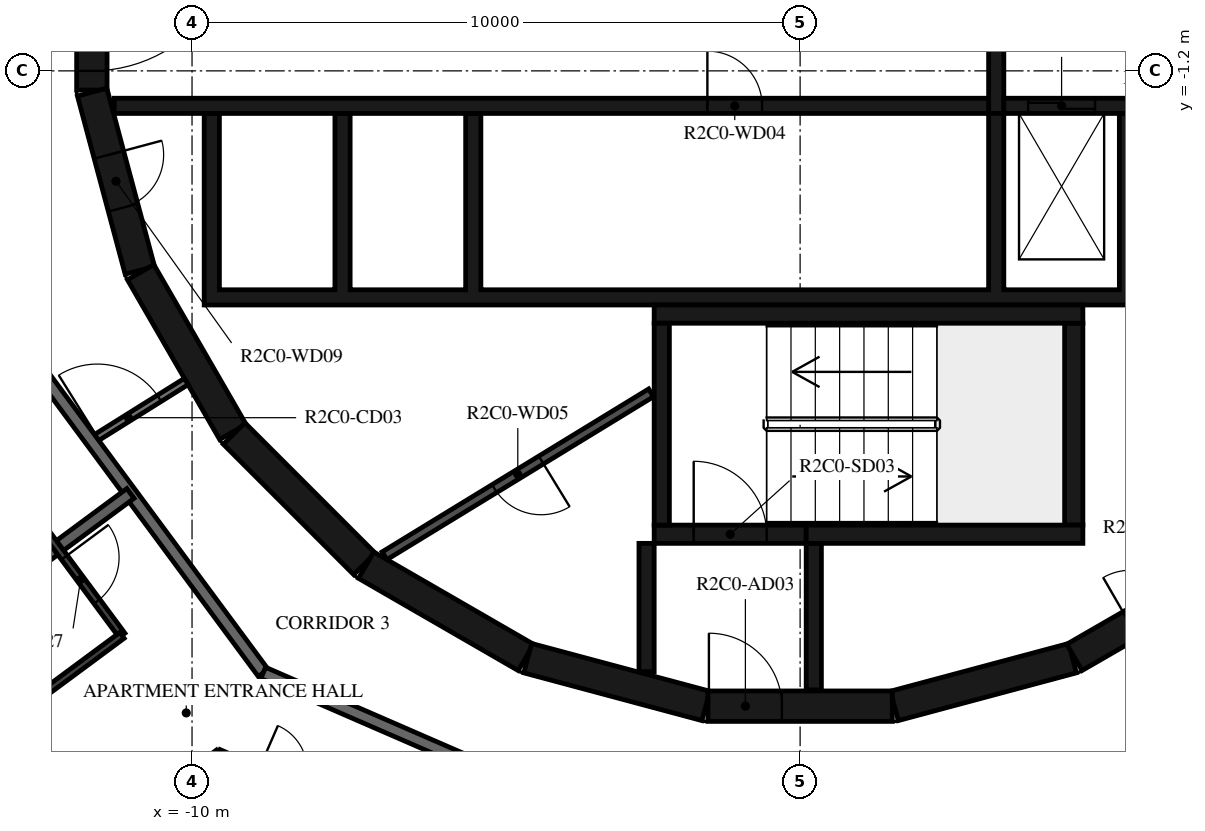
"""IFC4 building model, lengths in metres.
Left out: names, types, materials, properties, quantities, classifications, styles, units other than length and angle.
Written with IfcOpenShell. Run it as: python <this file> out.ifc"""

import sys

from ifc_helpers import new_model, si_unit, direction, frame, frame_2d, origin, place, context, subcontext, project, spatial, polyline, rectangle, outline, extrude, element, fill, save


model = new_model("IFC4")
c1 = context("Model", 3, precision=1e-05, world=origin(), true_north=direction((0.0, 1.0)))
c2 = subcontext(c1, "Body", "Model", "MODEL_VIEW")
j1 = project(units=[si_unit("LENGTHUNIT", "METRE"), si_unit("PLANEANGLEUNIT", "RADIAN")], contexts=[c1])
p1 = place(None, origin())
s1 = spatial("IfcSite", under=j1, at=p1, CompositionType="ELEMENT")
p2 = place(p1, origin())
s2 = spatial("IfcBuilding", under=s1, at=p2, CompositionType="ELEMENT")
p3 = place(p2, frame((0.0, 0.0, 104.7)))
s3 = spatial("IfcBuildingStorey", under=s2, at=p3, CompositionType="ELEMENT", Elevation=104.7)
p4 = place(p3, frame((1.55, -11.643, 0.0), z_axis=(0.0, 0.0, 1.0), x_axis=(0.965948410781, 0.258734743916, 0.0)))
e1 = element("IfcWall", 1, at=p4, inside=s3, PredefinedType="SHEAR", context=c2, shape_type="SweptSolid", body=[
    extrude(rectangle(XDim=3.033, YDim=0.5, at=frame_2d((1.516, 0.0))), origin(), (0.0, 0.0, 1.0), 3.05),
])
p5 = place(p3, frame((4.51, -10.845, 0.0), z_axis=(0.0, 0.0, 1.0), x_axis=(0.865975092491, 0.500087131594, 0.0)))
e2 = element("IfcWall", 2, at=p5, inside=s3, PredefinedType="SHEAR", context=c2, shape_type="SweptSolid", body=[
    extrude(rectangle(XDim=3.033, YDim=0.5, at=frame_2d((1.516, 0.0))), origin(), (0.0, 0.0, 1.0), 3.05),
])
p6 = place(p5, frame((1.066, 0.0, 0.0)))
e3 = element("IfcOpeningElement", 3, at=p6, cuts=e2, PredefinedType="OPENING", context=c2, shape_type="SweptSolid", body=[
    extrude(rectangle(XDim=0.9, YDim=2.1, at=frame_2d((0.45, 1.05))), frame((0.0, 0.26, 0.0), z_axis=(0.0, -1.0, 0.0), x_axis=(1.0, 0.0, 0.0)), (0.0, 0.0, 1.0), 0.52),
])
p7 = place(p3, frame((-11.647, 1.516, 0.0), z_axis=(0.0, 0.0, 1.0), x_axis=(0.0, -1.0, 0.0)))
e4 = element("IfcWall", 4, at=p7, inside=s3, PredefinedType="SHEAR", context=c2, shape_type="SweptSolid", body=[
    extrude(rectangle(XDim=3.033, YDim=0.5, at=frame_2d((1.516, 0.0))), origin(), (0.0, 0.0, 1.0), 3.05),
])
p8 = place(p7, frame((0.316, 0.0, 0.0)))
e5 = element("IfcOpeningElement", 5, at=p8, cuts=e4, PredefinedType="OPENING", context=c2, shape_type="SweptSolid", body=[
    extrude(rectangle(XDim=2.4, YDim=2.1, at=frame_2d((1.2, 1.05))), frame((0.0, 0.26, 0.0), z_axis=(0.0, -1.0, 0.0), x_axis=(1.0, 0.0, 0.0)), (0.0, 0.0, 1.0), 0.52),
])
p9 = place(p3, frame((-11.643, -1.55, 0.0), z_axis=(0.0, 0.0, 1.0), x_axis=(0.258734743916, -0.965948410781, 0.0)))
e6 = element("IfcWall", 6, at=p9, inside=s3, PredefinedType="SHEAR", context=c2, shape_type="SweptSolid", body=[
    extrude(rectangle(XDim=3.033, YDim=0.5, at=frame_2d((1.516, 0.0))), origin(), (0.0, 0.0, 1.0), 3.05),
])
p10 = place(p9, frame((1.066, 0.0, 0.0)))
e7 = element("IfcOpeningElement", 7, at=p10, cuts=e6, PredefinedType="OPENING", context=c2, shape_type="SweptSolid", body=[
    extrude(rectangle(XDim=0.9, YDim=2.1, at=frame_2d((0.45, 1.05))), frame((0.0, 0.26, 0.0), z_axis=(0.0, -1.0, 0.0), x_axis=(1.0, 0.0, 0.0)), (0.0, 0.0, 1.0), 0.52),
])
p11 = place(p3, frame((-10.845, -4.51, 0.0), z_axis=(0.0, 0.0, 1.0), x_axis=(0.500087131594, -0.865975092491, 0.0)))
e8 = element("IfcWall", 8, at=p11, inside=s3, PredefinedType="SHEAR", context=c2, shape_type="SweptSolid", body=[
    extrude(rectangle(XDim=3.033, YDim=0.5, at=frame_2d((1.516, 0.0))), origin(), (0.0, 0.0, 1.0), 3.05),
])
p12 = place(p3, frame((-9.308, -7.164, 0.0), z_axis=(0.0, 0.0, 1.0), x_axis=(0.707106781187, -0.707106781187, 0.0)))
e9 = element("IfcWall", 9, at=p12, inside=s3, PredefinedType="SHEAR", context=c2, shape_type="SweptSolid", body=[
    extrude(rectangle(XDim=3.032, YDim=0.5, at=frame_2d((1.516, 0.0))), origin(), (0.0, 0.0, 1.0), 3.05),
])
for number, where, z_axis, x_axis in (
    (10, (-7.137, -9.329, 0.0), (0.0, 0.0, 1.0), (0.866, -0.5, 0.0)),
    (11, (-4.479, -10.858, 0.0), (0.0, 0.0, 1.0), (0.966, -0.259, 0.0)),
):
    element("IfcWall", number, at=place(p3, frame(where, z_axis=z_axis, x_axis=x_axis)), inside=s3, PredefinedType="SHEAR", context=c2, shape_type="SweptSolid", body=[
        extrude(rectangle(XDim=3.033, YDim=0.5, at=frame_2d((1.516, 0.0))), origin(), (0.0, 0.0, 1.0), 3.05),
    ])
p13 = place(p3, frame((-1.516, -11.647, 0.0), z_axis=(0.0, 0.0, 1.0), x_axis=(1.0, 0.0, 0.0)))
e12 = element("IfcWall", 12, at=p13, inside=s3, PredefinedType="SHEAR", context=c2, shape_type="SweptSolid", body=[
    extrude(rectangle(XDim=3.033, YDim=0.5, at=frame_2d((1.516, 0.0))), origin(), (0.0, 0.0, 1.0), 3.05),
])
p14 = place(p13, frame((0.016, 0.0, 0.0)))
e13 = element("IfcOpeningElement", 13, at=p14, cuts=e12, PredefinedType="OPENING", context=c2, shape_type="SweptSolid", body=[
    extrude(rectangle(XDim=1.2, YDim=2.1, at=frame_2d((0.6, 1.05))), frame((0.0, 0.26, 0.0), z_axis=(0.0, -1.0, 0.0), x_axis=(1.0, 0.0, 0.0)), (0.0, 0.0, 1.0), 0.52),
])
p15 = place(p3, frame((-2.275, -8.67, 0.0), z_axis=(0.0, 0.0, 1.0), x_axis=(0.0, 1.0, 0.0)))
e14 = element("IfcWall", 14, at=p15, inside=s3, PredefinedType="SHEAR", context=c2, shape_type="SweptSolid", body=[
    extrude(rectangle(XDim=3.32, YDim=0.25, at=frame_2d((1.66, 0.0))), origin(), (0.0, 0.0, 1.0), 3.05),
])
p16 = place(p3, frame((-2.4, -5.2, 0.0), z_axis=(0.0, 0.0, 1.0), x_axis=(1.0, 0.0, 0.0)))
e15 = element("IfcWall", 15, at=p16, inside=s3, PredefinedType="SHEAR", context=c2, shape_type="SweptSolid", body=[
    extrude(rectangle(XDim=7.05, YDim=0.3, at=frame_2d((3.525, 0.0))), origin(), (0.0, 0.0, 1.0), 3.05),
])
p17 = place(p3, frame((4.5, -8.67, 0.0), z_axis=(0.0, 0.0, 1.0), x_axis=(0.0, 1.0, 0.0)))
e16 = element("IfcWall", 16, at=p17, inside=s3, PredefinedType="SHEAR", context=c2, shape_type="SweptSolid", body=[
    extrude(rectangle(XDim=3.32, YDim=0.3, at=frame_2d((1.66, 0.0))), origin(), (0.0, 0.0, 1.0), 3.05),
])
p18 = place(p3, frame((0.1, -8.82, 0.0), z_axis=(0.0, 0.0, 1.0), x_axis=(1.0, 0.0, 0.0)))
e17 = element("IfcWall", 17, at=p18, inside=s3, PredefinedType="SHEAR", context=c2, shape_type="SweptSolid", body=[
    extrude(rectangle(XDim=4.55, YDim=0.3, at=frame_2d((2.275, 0.0))), origin(), (0.0, 0.0, 1.0), 3.05),
])
p19 = place(p3, frame((-2.4, -8.82, 0.0), z_axis=(0.0, 0.0, 1.0), x_axis=(1.0, 0.0, 0.0)))
e18 = element("IfcWall", 18, at=p19, inside=s3, PredefinedType="SHEAR", context=c2, shape_type="SweptSolid", body=[
    extrude(rectangle(XDim=2.5, YDim=0.3, at=frame_2d((1.25, 0.0))), origin(), (0.0, 0.0, 1.0), 3.05),
])
p20 = place(p19, frame((0.65, 0.0, 0.0)))
e19 = element("IfcOpeningElement", 19, at=p20, cuts=e18, PredefinedType="OPENING", context=c2, shape_type="SweptSolid", body=[
    extrude(rectangle(XDim=1.2, YDim=2.1, at=frame_2d((0.6, 1.05))), frame((0.0, 0.16, 0.0), z_axis=(0.0, -1.0, 0.0), x_axis=(1.0, 0.0, 0.0)), (0.0, 0.0, 1.0), 0.32),
])
p21 = place(p3, frame((-2.525, -8.97, 0.0), z_axis=(0.0, 0.0, 1.0), x_axis=(0.0, -1.0, 0.0)))
e20 = element("IfcWall", 20, at=p21, inside=s3, PredefinedType="SHEAR", context=c2, shape_type="SweptSolid", body=[
    extrude(rectangle(XDim=2.11, YDim=0.25, at=frame_2d((1.055, 0.0))), origin(), (0.0, 0.0, 1.0), 3.05),
])
p22 = place(p3, frame((0.225, -8.97, 0.0), z_axis=(0.0, 0.0, 1.0), x_axis=(0.0, -1.0, 0.0)))
e21 = element("IfcWall", 21, at=p22, inside=s3, PredefinedType="SHEAR", context=c2, shape_type="SweptSolid", body=[
    extrude(rectangle(XDim=2.41, YDim=0.25, at=frame_2d((1.205, 0.0))), origin(), (0.0, 0.0, 1.0), 3.05),
])
p23 = place(p3, origin())
e22 = element("IfcWall", 22, at=p23, inside=s3, PredefinedType="SHEAR", context=c2, shape_type="SweptSolid", body=[
    extrude(outline(polyline([(9.8, -5.05), (9.8, -4.8), (9.8, -1.9), (9.55, -1.9), (9.55, -4.8), (7.65, -4.8), (7.65, -1.9), (7.4, -1.9), (7.4, -4.8), (5.5, -4.8), (5.5, -1.9), (5.25, -1.9), (5.25, -4.8), (3.35, -4.8), (3.35, -1.9), (3.1, -1.9), (3.1, -4.8), (-5.25, -4.8), (-5.25, -1.9), (-5.5, -1.9), (-5.5, -4.8), (-7.4, -4.8), (-7.4, -1.9), (-7.65, -1.9), (-7.65, -4.8), (-9.55, -4.8), (-9.55, -1.9), (-9.8, -1.9), (-9.8, -4.8), (-9.8, -5.05), (9.8, -5.05)])), origin(), (0.0, 0.0, 1.0), 3.05),
])
p24 = place(p3, frame((-11.28, -1.775, 0.0), z_axis=(0.0, 0.0, 1.0), x_axis=(1.0, 0.0, 0.0)))
e23 = element("IfcWall", 23, at=p24, inside=s3, PredefinedType="SHEAR", context=c2, shape_type="SweptSolid", body=[
    extrude(rectangle(XDim=14.38, YDim=0.25, at=frame_2d((7.19, 0.0))), origin(), (0.0, 0.0, 1.0), 3.05),
])
p25 = place(p24, frame((9.755, 0.0, 0.0)))
e24 = element("IfcOpeningElement", 24, at=p25, cuts=e23, PredefinedType="OPENING", context=c2, shape_type="SweptSolid", body=[
    extrude(rectangle(XDim=0.9, YDim=2.1, at=frame_2d((0.45, 1.05))), frame((0.0, 0.135, 0.0), z_axis=(0.0, -1.0, 0.0), x_axis=(1.0, 0.0, 0.0)), (0.0, 0.0, 1.0), 0.27),
])
p26 = place(p3, frame((3.35, -1.775, 0.0), z_axis=(0.0, 0.0, 1.0), x_axis=(1.0, 0.0, 0.0)))
e25 = element("IfcWall", 25, at=p26, inside=s3, PredefinedType="SHEAR", context=c2, shape_type="SweptSolid", body=[
    extrude(rectangle(XDim=7.93, YDim=0.25, at=frame_2d((3.965, 0.0))), origin(), (0.0, 0.0, 1.0), 3.05),
])
p27 = place(p26, frame((0.4, 0.0, 0.0)))
e26 = element("IfcOpeningElement", 26, at=p27, cuts=e25, PredefinedType="OPENING", context=c2, shape_type="SweptSolid", body=[
    extrude(rectangle(XDim=1.1, YDim=2.4, at=frame_2d((0.55, 1.2))), frame((0.0, 0.135, 0.0), z_axis=(0.0, -1.0, 0.0), x_axis=(1.0, 0.0, 0.0)), (0.0, 0.0, 1.0), 0.27),
])
p28 = place(p26, frame((2.55, 0.0, 0.0)))
e27 = element("IfcOpeningElement", 27, at=p28, cuts=e25, PredefinedType="OPENING", context=c2, shape_type="SweptSolid", body=[
    extrude(rectangle(XDim=1.1, YDim=2.4, at=frame_2d((0.55, 1.2))), frame((0.0, 0.135, 0.0), z_axis=(0.0, -1.0, 0.0), x_axis=(1.0, 0.0, 0.0)), (0.0, 0.0, 1.0), 0.27),
])
p29 = place(p26, frame((4.7, 0.0, 0.0)))
e28 = element("IfcOpeningElement", 28, at=p29, cuts=e25, PredefinedType="OPENING", context=c2, shape_type="SweptSolid", body=[
    extrude(rectangle(XDim=1.1, YDim=2.4, at=frame_2d((0.55, 1.2))), frame((0.0, 0.135, 0.0), z_axis=(0.0, -1.0, 0.0), x_axis=(1.0, 0.0, 0.0)), (0.0, 0.0, 1.0), 0.27),
])
p30 = place(p3, frame((3.225, -1.9, 0.0), z_axis=(0.0, 0.0, 1.0), x_axis=(0.0, 1.0, 0.0)))
e29 = element("IfcWall", 29, at=p30, inside=s3, PredefinedType="SHEAR", context=c2, shape_type="SweptSolid", body=[
    extrude(rectangle(XDim=3.8, YDim=0.25, at=frame_2d((1.9, 0.0))), origin(), (0.0, 0.0, 1.0), 3.05),
])
p31 = place(p3, frame((-2.451, -6.495, 0.0), z_axis=(0.0, 0.0, 1.0), x_axis=(-0.853250115418, -0.521501908471, 0.0)))
e30 = element("IfcWall", 30, at=p31, inside=s3, PredefinedType="PARTITIONING", context=c2, shape_type="SweptSolid", body=[
    extrude(rectangle(XDim=5.137, YDim=0.15, at=frame_2d((2.569, 0.0))), origin(), (0.0, 0.0, 1.0), 3.05),
])
p32 = place(p31, frame((2.119, 0.0, 0.0)))
e31 = element("IfcOpeningElement", 31, at=p32, cuts=e30, PredefinedType="OPENING", context=c2, shape_type="SweptSolid", body=[
    extrude(rectangle(XDim=0.9, YDim=2.1, at=frame_2d((0.45, 1.05))), frame((0.0, 0.085, 0.0), z_axis=(0.0, -1.0, 0.0), x_axis=(1.0, 0.0, 0.0)), (0.0, 0.0, 1.0), 0.17),
])
p33 = place(p3, frame((-11.654, -7.282, 0.0), z_axis=(0.0, 0.0, 1.0), x_axis=(0.848117698675, 0.529807860638, 0.0)))
e32 = element("IfcWall", 32, at=p33, inside=s3, PredefinedType="PARTITIONING", context=c2, shape_type="SweptSolid", body=[
    extrude(rectangle(XDim=1.838, YDim=0.12, at=frame_2d((0.919, 0.0))), origin(), (0.0, 0.0, 1.0), 3.05),
])
p34 = place(p33, frame((0.115, 0.0, 0.0)))
e33 = element("IfcOpeningElement", 33, at=p34, cuts=e32, PredefinedType="OPENING", context=c2, shape_type="SweptSolid", body=[
    extrude(rectangle(XDim=1.2, YDim=2.1, at=frame_2d((0.6, 1.05))), frame((0.0, 0.07, 0.0), z_axis=(0.0, -1.0, 0.0), x_axis=(1.0, 0.0, 0.0)), (0.0, 0.0, 1.0), 0.14),
])
p35 = place(p3, frame((-13.196, -5.198, 0.0), z_axis=(0.0, 0.0, 1.0), x_axis=(0.594805187394, -0.803869883159, 0.0)))
e34 = element("IfcWall", 34, at=p35, inside=s3, PredefinedType="STANDARD", context=c2, shape_type="SweptSolid", body=[
    extrude(rectangle(XDim=7.342, YDim=0.2, at=frame_2d((3.671, 0.0))), origin(), (0.0, 0.0, 1.0), 3.05),
])
p36 = place(p3, frame((-8.829, -11.1, 0.0), z_axis=(0.0, 0.0, 1.0), x_axis=(0.917063622491, -0.398740908742, 0.0)))
e35 = element("IfcWall", 35, at=p36, inside=s3, PredefinedType="STANDARD", context=c2, shape_type="SweptSolid", body=[
    extrude(rectangle(XDim=7.24, YDim=0.2, at=frame_2d((3.62, 0.0))), origin(), (0.0, 0.0, 1.0), 3.05),
])
p37 = place(p36, frame((6.04, 0.0, 0.0)))
e36 = element("IfcOpeningElement", 36, at=p37, cuts=e35, PredefinedType="OPENING", context=c2, shape_type="SweptSolid", body=[
    extrude(rectangle(XDim=1.0, YDim=2.1, at=frame_2d((0.5, 1.05))), frame((0.0, 0.11, 0.0), z_axis=(0.0, -1.0, 0.0), x_axis=(1.0, 0.0, 0.0)), (0.0, 0.0, 1.0), 0.22),
])
p38 = place(p3, frame((5.198, -13.196, 0.0), z_axis=(0.0, 0.0, 1.0), x_axis=(0.803869883159, 0.594805187394, 0.0)))
e37 = element("IfcWall", 37, at=p38, inside=s3, PredefinedType="STANDARD", context=c2, shape_type="SweptSolid", body=[
    extrude(rectangle(XDim=7.342, YDim=0.2, at=frame_2d((3.671, 0.0))), origin(), (0.0, 0.0, 1.0), 3.05),
])
p39 = place(p3, frame((-16.649, -12.32, 0.0), z_axis=(0.0, 0.0, 1.0), x_axis=(0.803869204071, 0.594806105169, 0.0)))
e38 = element("IfcWall", 38, at=p39, inside=s3, PredefinedType="STANDARD", context=c2, shape_type="SweptSolid", body=[
    extrude(rectangle(XDim=7.011, YDim=0.2, at=frame_2d((3.506, 0.0))), origin(), (0.0, 0.0, 1.0), 3.05),
])
p40 = place(p3, frame((-13.164, -7.764, 0.0), z_axis=(0.0, 0.0, 1.0), x_axis=(0.594837409261, -0.803846040324, 0.0)))
e39 = element("IfcWall", 39, at=p40, inside=s3, PredefinedType="PARTITIONING", context=c2, shape_type="SweptSolid", body=[
    extrude(rectangle(XDim=3.383, YDim=0.12, at=frame_2d((1.691, 0.0))), origin(), (0.0, 0.0, 1.0), 3.05),
])
p41 = place(p40, frame((1.789, 0.0, 0.0)))
e40 = element("IfcOpeningElement", 40, at=p41, cuts=e39, PredefinedType="OPENING", context=c2, shape_type="SweptSolid", body=[
    extrude(rectangle(XDim=0.9, YDim=2.1, at=frame_2d((0.45, 1.05))), frame((0.0, 0.07, 0.0), z_axis=(0.0, -1.0, 0.0), x_axis=(1.0, 0.0, 0.0)), (0.0, 0.0, 1.0), 0.14),
])
p42 = place(p3, frame((-11.152, -10.483, 0.0), z_axis=(0.0, 0.0, 1.0), x_axis=(-0.803843064298, -0.594841430954, 0.0)))
e41 = element("IfcWall", 41, at=p42, inside=s3, PredefinedType="PARTITIONING", context=c2, shape_type="SweptSolid", body=[
    extrude(rectangle(XDim=4.008, YDim=0.12, at=frame_2d((2.004, 0.0))), origin(), (0.0, 0.0, 1.0), 3.05),
])
p43 = place(p3, frame((-12.886, -14.877, 0.0), z_axis=(0.0, 0.0, 1.0), x_axis=(0.803816491389, 0.594877338761, 0.0)))
e42 = element("IfcWall", 42, at=p43, inside=s3, PredefinedType="PARTITIONING", context=c2, shape_type="SweptSolid", body=[
    extrude(rectangle(XDim=4.135, YDim=0.12, at=frame_2d((2.068, 0.0))), origin(), (0.0, 0.0, 1.0), 3.05),
])
p44 = place(p3, frame((-9.562, -12.417, 0.0), z_axis=(0.0, 0.0, 1.0), x_axis=(0.917063169851, -0.398741949767, 0.0)))
e43 = element("IfcWall", 43, at=p44, inside=s3, PredefinedType="PARTITIONING", context=c2, shape_type="SweptSolid", body=[
    extrude(rectangle(XDim=7.891, YDim=0.12, at=frame_2d((3.946, 0.0))), origin(), (0.0, 0.0, 1.0), 3.05),
])
p45 = place(p44, frame((0.715, 0.0, 0.0)))
e44 = element("IfcOpeningElement", 44, at=p45, cuts=e43, PredefinedType="OPENING", context=c2, shape_type="SweptSolid", body=[
    extrude(rectangle(XDim=0.8, YDim=2.1, at=frame_2d((0.4, 1.05))), frame((0.0, 0.07, 0.0), z_axis=(0.0, -1.0, 0.0), x_axis=(1.0, 0.0, 0.0)), (0.0, 0.0, 1.0), 0.14),
])
p46 = place(p20, origin())
e45 = element("IfcDoor", 45, at=p46, inside=s3, OperationType="SINGLE_SWING_LEFT", PredefinedType="DOOR", context=c2, shape_type="SweptSolid", body=[
    extrude(rectangle(XDim=1.2, YDim=2.1, at=frame_2d((0.6, 1.05))), frame((0.0, 0.025, 0.0), z_axis=(0.0, -1.0, 0.0), x_axis=(1.0, 0.0, 0.0)), (0.0, 0.0, 1.0), 0.05),
])
fill(e19, e45)
p47 = place(p14, origin())
e46 = element("IfcDoor", 46, at=p47, inside=s3, OperationType="SINGLE_SWING_RIGHT", PredefinedType="DOOR", context=c2, shape_type="SweptSolid", body=[
    extrude(rectangle(XDim=1.2, YDim=2.1, at=frame_2d((0.6, 1.05))), frame((0.0, 0.025, 0.0), z_axis=(0.0, -1.0, 0.0), x_axis=(1.0, 0.0, 0.0)), (0.0, 0.0, 1.0), 0.05),
])
fill(e13, e46)
p48 = place(p8, origin())
e47 = element("IfcDoor", 47, at=p48, inside=s3, OperationType="DOUBLE_DOOR_SINGLE_SWING", PredefinedType="DOOR", context=c2, shape_type="SweptSolid", body=[
    extrude(rectangle(XDim=2.4, YDim=2.1, at=frame_2d((1.2, 1.05))), frame((0.0, 0.025, 0.0), z_axis=(0.0, -1.0, 0.0), x_axis=(1.0, 0.0, 0.0)), (0.0, 0.0, 1.0), 0.05),
])
fill(e5, e47)
p49 = place(p27, origin())
e48 = element("IfcDoor", 48, at=p49, inside=s3, OperationType="DOUBLE_DOOR_SLIDING", PredefinedType="DOOR", context=c2, shape_type="SweptSolid", body=[
    extrude(rectangle(XDim=1.1, YDim=2.4, at=frame_2d((0.55, 1.2))), frame((0.0, 0.025, 0.0), z_axis=(0.0, -1.0, 0.0), x_axis=(1.0, 0.0, 0.0)), (0.0, 0.0, 1.0), 0.05),
])
fill(e26, e48)
p50 = place(p25, origin())
e49 = element("IfcDoor", 49, at=p50, inside=s3, OperationType="SINGLE_SWING_LEFT", PredefinedType="DOOR", context=c2, shape_type="SweptSolid", body=[
    extrude(rectangle(XDim=0.9, YDim=2.1, at=frame_2d((0.45, 1.05))), frame((0.0, 0.025, 0.0), z_axis=(0.0, -1.0, 0.0), x_axis=(1.0, 0.0, 0.0)), (0.0, 0.0, 1.0), 0.05),
])
fill(e24, e49)
p51 = place(p32, origin())
e50 = element("IfcDoor", 50, at=p51, inside=s3, OperationType="SINGLE_SWING_RIGHT", PredefinedType="DOOR", context=c2, shape_type="SweptSolid", body=[
    extrude(rectangle(XDim=0.9, YDim=2.1, at=frame_2d((0.45, 1.05))), frame((0.0, 0.025, 0.0), z_axis=(0.0, -1.0, 0.0), x_axis=(1.0, 0.0, 0.0)), (0.0, 0.0, 1.0), 0.05),
])
fill(e31, e50)
p52 = place(p10, origin())
e51 = element("IfcDoor", 51, at=p52, inside=s3, OperationType="SINGLE_SWING_RIGHT", PredefinedType="DOOR", context=c2, shape_type="SweptSolid", body=[
    extrude(rectangle(XDim=0.9, YDim=2.1, at=frame_2d((0.45, 1.05))), frame((0.0, 0.025, 0.0), z_axis=(0.0, -1.0, 0.0), x_axis=(1.0, 0.0, 0.0)), (0.0, 0.0, 1.0), 0.05),
])
fill(e7, e51)
p53 = place(p41, origin())
e52 = element("IfcDoor", 52, at=p53, inside=s3, OperationType="SINGLE_SWING_LEFT", PredefinedType="DOOR", context=c2, shape_type="SweptSolid", body=[
    extrude(rectangle(XDim=0.9, YDim=2.1, at=frame_2d((0.45, 1.05))), frame((0.0, 0.025, 0.0), z_axis=(0.0, -1.0, 0.0), x_axis=(1.0, 0.0, 0.0)), (0.0, 0.0, 1.0), 0.05),
])
fill(e40, e52)
p54 = place(p34, origin())
e53 = element("IfcDoor", 53, at=p54, inside=s3, OperationType="DOUBLE_DOOR_SINGLE_SWING", PredefinedType="DOOR", context=c2, shape_type="SweptSolid", body=[
    extrude(rectangle(XDim=1.2, YDim=2.1, at=frame_2d((0.6, 1.05))), frame((0.0, 0.025, 0.0), z_axis=(0.0, -1.0, 0.0), x_axis=(1.0, 0.0, 0.0)), (0.0, 0.0, 1.0), 0.05),
])
fill(e33, e53)
save(model, sys.argv[1])
